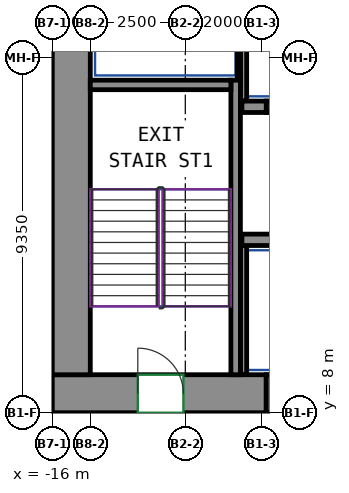
"""IFC4 building model, lengths in metres.
Left out: names, types, materials, properties, quantities, classifications, styles, units other than length and angle.
Written with IfcOpenShell. Run it as: python <this file> out.ifc"""

import sys

from ifc_helpers import new_model, si_unit, direction, frame, frame_2d, origin, place, context, subcontext, project, spatial, rectangle, extrude, source, transform, mapped, element, fill, save


model = new_model("IFC4")
c1 = context("Model", 3, precision=1e-05, world=origin(), true_north=direction((0.0, 1.0)))
c2 = subcontext(c1, "Body", "Model", "MODEL_VIEW")
j1 = project(units=[si_unit("LENGTHUNIT", "METRE"), si_unit("PLANEANGLEUNIT", "RADIAN")], contexts=[c1])
p1 = place(None, origin())
s1 = spatial("IfcSite", under=j1, at=p1, CompositionType="ELEMENT")
p2 = place(p1, origin())
s2 = spatial("IfcBuilding", under=s1, at=p2, CompositionType="ELEMENT")
p3 = place(p2, frame((0.0, 0.0, 87.2)))
s3 = spatial("IfcBuildingStorey", under=s2, at=p3, CompositionType="ELEMENT", Elevation=87.2)
m1 = source(origin(), c2, "Body", "SweptSolid", [
    extrude(rectangle(XDim=5.63, YDim=1.0, at=frame_2d((2.815, 0.0))), origin(), (0.0, 0.0, 1.0), 3.72),
])
p4 = place(p3, frame((-16.0, 8.5, 0.0), z_axis=(0.0, 0.0, 1.0), x_axis=(1.0, 0.0, 0.0)))
e1 = element("IfcWall", 1, at=p4, inside=s3, PredefinedType="SHEAR", context=c2, shape_type="MappedRepresentation", body=[
    mapped(m1, transform((0.0, 0.0, 0.0))),
])
p5 = place(p4, frame((2.25, 0.0, 0.0)))
e2 = element("IfcOpeningElement", 2, at=p5, cuts=e1, PredefinedType="OPENING", context=c2, shape_type="SweptSolid", body=[
    extrude(rectangle(XDim=1.2, YDim=2.1, at=frame_2d((0.6, 1.05))), frame((0.0, 0.51, 0.0), z_axis=(0.0, -1.0, 0.0), x_axis=(1.0, 0.0, 0.0)), (0.0, 0.0, 1.0), 1.02),
])
m2 = source(origin(), c2, "Body", "SweptSolid", [
    extrude(rectangle(XDim=12.0, YDim=1.0, at=frame_2d((6.0, 0.0))), origin(), (0.0, 0.0, 1.0), 3.72),
])
p6 = place(p3, frame((-15.5, 9.0, 0.0), z_axis=(0.0, 0.0, 1.0), x_axis=(0.0, 1.0, 0.0)))
e3 = element("IfcWall", 3, at=p6, inside=s3, PredefinedType="SHEAR", context=c2, shape_type="MappedRepresentation", body=[
    mapped(m2, transform((0.0, 0.0, 0.0))),
])
m3 = source(origin(), c2, "Body", "SweptSolid", [
    extrude(rectangle(XDim=7.75, YDim=0.25, at=frame_2d((3.875, 0.0))), origin(), (0.0, 0.0, 1.0), 3.72),
])
p7 = place(p3, frame((-11.175, 9.0, 0.0), z_axis=(0.0, 0.0, 1.0), x_axis=(0.0, 1.0, 0.0)))
e4 = element("IfcWall", 4, at=p7, inside=s3, PredefinedType="SHEAR", context=c2, shape_type="MappedRepresentation", body=[
    mapped(m3, transform((0.0, 0.0, 0.0))),
])
m4 = source(origin(), c2, "Body", "SweptSolid", [
    extrude(rectangle(XDim=3.7, YDim=0.25, at=frame_2d((1.85, 0.0))), origin(), (0.0, 0.0, 1.0), 3.72),
])
p8 = place(p3, frame((-15.0, 16.625, 0.0), z_axis=(0.0, 0.0, 1.0), x_axis=(1.0, 0.0, 0.0)))
e5 = element("IfcWall", 5, at=p8, inside=s3, PredefinedType="SHEAR", context=c2, shape_type="MappedRepresentation", body=[
    mapped(m4, transform((0.0, 0.0, 0.0))),
])
m5 = source(origin(), c2, "Body", "SweptSolid", [
    extrude(rectangle(XDim=6.0, YDim=0.3, at=frame_2d((3.0, 0.0))), origin(), (0.0, 0.0, 1.0), 3.72),
])
p9 = place(p3, frame((-11.01, 12.55, 0.0), z_axis=(0.0, 0.0, 1.0), x_axis=(1.0, 0.0, 0.0)))
e6 = element("IfcWall", 6, at=p9, inside=s3, PredefinedType="SHEAR", context=c2, shape_type="MappedRepresentation", body=[
    mapped(m5, transform((0.0, 0.0, 0.0))),
])
m6 = source(origin(), c2, "Body", "SweptSolid", [
    extrude(rectangle(XDim=0.64, YDim=0.3, at=frame_2d((0.32, 0.0))), origin(), (0.0, 0.0, 1.0), 3.72),
])
p10 = place(p3, frame((-11.01, 16.05, 0.0), z_axis=(0.0, 0.0, 1.0), x_axis=(1.0, 0.0, 0.0)))
e7 = element("IfcWall", 7, at=p10, inside=s3, PredefinedType="SHEAR", context=c2, shape_type="MappedRepresentation", body=[
    mapped(m6, transform((0.0, 0.0, 0.0))),
])
m7 = source(origin(), c2, "Body", "SweptSolid", [
    extrude(rectangle(XDim=1.4, YDim=0.3, at=frame_2d((0.7, 0.0))), origin(), (0.0, 0.0, 1.0), 3.72),
])
p11 = place(p3, frame((-10.37, 16.05, 0.0), z_axis=(0.0, 0.0, 1.0), x_axis=(1.0, 0.0, 0.0)))
e8 = element("IfcWall", 8, at=p11, inside=s3, PredefinedType="PARTITIONING", context=c2, shape_type="MappedRepresentation", body=[
    mapped(m7, transform((0.0, 0.0, 0.0))),
])
p12 = place(p11, frame((0.15, 0.0, 0.0)))
e9 = element("IfcOpeningElement", 9, at=p12, cuts=e8, PredefinedType="OPENING", context=c2, shape_type="SweptSolid", body=[
    extrude(rectangle(XDim=1.1, YDim=2.1, at=frame_2d((0.55, 1.05))), frame((0.0, 0.16, 0.0), z_axis=(0.0, -1.0, 0.0), x_axis=(1.0, 0.0, 0.0)), (0.0, 0.0, 1.0), 0.32),
])
m8 = source(origin(), c2, "Body", "SweptSolid", [
    extrude(rectangle(XDim=3.275, YDim=0.165, at=frame_2d((1.638, 0.0))), origin(), (0.0, 0.0, 1.0), 3.72),
])
p13 = place(p3, frame((-10.968, 16.2, 0.0), z_axis=(0.0, 0.0, 1.0), x_axis=(0.0, 1.0, 0.0)))
e10 = element("IfcWall", 10, at=p13, inside=s3, PredefinedType="PARTITIONING", context=c2, shape_type="MappedRepresentation", body=[
    mapped(m8, transform((0.0, 0.0, 0.0))),
])
m9 = source(origin(), c2, "Body", "SweptSolid", [
    extrude(rectangle(XDim=2.725, YDim=0.085, at=frame_2d((1.363, 0.0))), origin(), (0.0, 0.0, 1.0), 3.72),
])
p14 = place(p3, frame((-11.093, 16.75, 0.0), z_axis=(0.0, 0.0, 1.0), x_axis=(0.0, 1.0, 0.0)))
e11 = element("IfcWall", 11, at=p14, inside=s3, PredefinedType="PARTITIONING", context=c2, shape_type="MappedRepresentation", body=[
    mapped(m9, transform((0.0, 0.0, 0.0))),
])
m10 = source(origin(), c2, "Body", "SweptSolid", [
    extrude(rectangle(XDim=3.4, YDim=0.165, at=frame_2d((1.7, 0.0))), origin(), (0.0, 0.0, 1.0), 3.72),
])
p15 = place(p3, frame((-10.968, 9.0, 0.0), z_axis=(0.0, 0.0, 1.0), x_axis=(0.0, 1.0, 0.0)))
e12 = element("IfcWall", 12, at=p15, inside=s3, PredefinedType="PARTITIONING", context=c2, shape_type="MappedRepresentation", body=[
    mapped(m10, transform((0.0, 0.0, 0.0))),
])
m11 = source(origin(), c2, "Body", "SweptSolid", [
    extrude(rectangle(XDim=1.4, YDim=1.0, at=frame_2d((0.7, 0.0))), origin(), (0.0, 0.0, 1.0), 2.7),
])
p16 = place(p3, frame((-10.37, 8.5, 0.0), z_axis=(0.0, 0.0, 1.0), x_axis=(1.0, 0.0, 0.0)))
e13 = element("IfcWall", 13, at=p16, inside=s3, PredefinedType="PARTITIONING", context=c2, shape_type="MappedRepresentation", body=[
    mapped(m11, transform((0.0, 0.0, 0.0))),
])
p17 = place(p16, frame((0.25, 0.0, 0.0)))
e14 = element("IfcOpeningElement", 14, at=p17, cuts=e13, PredefinedType="OPENING", context=c2, shape_type="SweptSolid", body=[
    extrude(rectangle(XDim=0.9, YDim=2.1, at=frame_2d((0.45, 1.05))), frame((0.0, 0.51, 0.0), z_axis=(0.0, -1.0, 0.0), x_axis=(1.0, 0.0, 0.0)), (0.0, 0.0, 1.0), 1.02),
])
p18 = place(p5, origin())
e15 = element("IfcDoor", 15, at=p18, inside=s3, OperationType="DOUBLE_DOOR_SINGLE_SWING", PredefinedType="DOOR", context=c2, shape_type="SweptSolid", body=[
    extrude(rectangle(XDim=1.2, YDim=2.1, at=frame_2d((0.6, 1.05))), frame((0.0, 0.405, 0.0), z_axis=(0.0, -1.0, 0.0), x_axis=(1.0, 0.0, 0.0)), (0.0, 0.0, 1.0), 0.05),
])
fill(e2, e15)
save(model, sys.argv[1])
